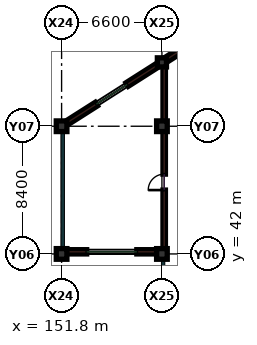
"""IFC4 building model, lengths in metres.
Left out: names, types, materials, properties, quantities, classifications, styles, units other than length and angle.
Written with IfcOpenShell. Run it as: python <this file> out.ifc"""

import sys

from ifc_helpers import new_model, si_unit, direction, frame, frame_2d, origin, origin_2d, place, context, subcontext, project, spatial, rectangle, extrude, element, fill, save


model = new_model("IFC4")
c1 = context("Model", 3, precision=1e-05, world=origin(), true_north=direction((0.0, 1.0)))
c2 = subcontext(c1, "Body", "Model", "MODEL_VIEW")
j1 = project(units=[si_unit("LENGTHUNIT", "METRE"), si_unit("PLANEANGLEUNIT", "RADIAN")], contexts=[c1])
p1 = place(None, origin())
s1 = spatial("IfcSite", under=j1, at=p1, CompositionType="ELEMENT")
p2 = place(p1, origin())
s2 = spatial("IfcBuilding", under=s1, at=p2, CompositionType="ELEMENT")
p3 = place(p2, frame((0.0, 0.0, 22.8)))
s3 = spatial("IfcBuildingStorey", under=s2, at=p3, CompositionType="ELEMENT", Elevation=22.8)
for number, where, z_axis, x_axis in (
    (1, (151.8, 42.0, 0.0), (0.0, 0.0, 1.0), (1.0, 0.0, 0.0)),
    (2, (151.8, 50.4, 0.0), (0.0, 0.0, 1.0), (1.0, 0.0, 0.0)),
    (3, (158.4, 42.0, 0.0), (0.0, 0.0, 1.0), (1.0, 0.0, 0.0)),
    (4, (158.4, 50.4, 0.0), (0.0, 0.0, 1.0), (1.0, 0.0, 0.0)),
):
    element("IfcColumn", number, at=place(p3, frame(where, z_axis=z_axis, x_axis=x_axis)), inside=s3, PredefinedType="COLUMN", context=c2, shape_type="SweptSolid", body=[
        extrude(rectangle(XDim=0.7, YDim=0.7, at=origin_2d()), origin(), (0.0, 0.0, 1.0), 4.2),
    ])
p4 = place(p3, frame((158.4, 54.6, 0.0), z_axis=(0.0, 0.0, 1.0), x_axis=(1.0, 0.0, 0.0)))
e5 = element("IfcColumn", 5, at=p4, inside=s3, PredefinedType="COLUMN", context=c2, shape_type="SweptSolid", body=[
    extrude(rectangle(XDim=0.6, YDim=0.6, at=origin_2d()), origin(), (0.0, 0.0, 1.0), 4.2),
])
p5 = place(p3, frame((158.55, 42.0, 0.0), z_axis=(0.0, 0.0, 1.0), x_axis=(0.0, 1.0, 0.0)))
e6 = element("IfcWall", 6, at=p5, inside=s3, PredefinedType="PARTITIONING", context=c2, shape_type="SweptSolid", body=[
    extrude(rectangle(XDim=7.95, YDim=0.16, at=frame_2d((3.975, 0.0))), origin(), (0.0, 0.0, 1.0), 3.23),
])
p6 = place(p5, frame((4.2, 0.0, 0.0)))
e7 = element("IfcOpeningElement", 7, at=p6, cuts=e6, PredefinedType="OPENING", context=c2, shape_type="SweptSolid", body=[
    extrude(rectangle(XDim=1.05, YDim=2.15, at=frame_2d((0.525, 1.075))), frame((0.0, 0.09, 0.0), z_axis=(0.0, -1.0, 0.0), x_axis=(1.0, 0.0, 0.0)), (0.0, 0.0, 1.0), 0.18),
])
p7 = place(p3, frame((158.55, 50.85, 0.0), z_axis=(0.0, 0.0, 1.0), x_axis=(0.0, 1.0, 0.0)))
e8 = element("IfcWall", 8, at=p7, inside=s3, PredefinedType="PARTITIONING", context=c2, shape_type="SweptSolid", body=[
    extrude(rectangle(XDim=3.8, YDim=0.16, at=frame_2d((1.9, 0.0))), origin(), (0.0, 0.0, 1.0), 3.23),
])
p8 = place(p3, frame((152.145, 42.14, 0.0), z_axis=(0.0, 0.0, 1.0), x_axis=(1.0, 0.0, 0.0)))
e9 = element("IfcWall", 9, at=p8, inside=s3, PredefinedType="SOLIDWALL", context=c2, shape_type="SweptSolid", body=[
    extrude(rectangle(XDim=5.91, YDim=0.28, at=frame_2d((2.955, 0.0))), origin(), (0.0, 0.0, 1.0), 3.365),
])
p9 = place(p8, frame((1.305, 0.0, 1.35)))
e10 = element("IfcOpeningElement", 10, at=p9, cuts=e9, PredefinedType="OPENING", context=c2, shape_type="SweptSolid", body=[
    extrude(rectangle(XDim=3.3, YDim=1.05, at=frame_2d((1.65, 0.525))), frame((0.0, 0.15, 0.0), z_axis=(0.0, -1.0, 0.0), x_axis=(1.0, 0.0, 0.0)), (0.0, 0.0, 1.0), 0.3),
])
p10 = place(p3, frame((152.05, 50.56, 0.0), z_axis=(0.0, 0.0, 1.0), x_axis=(0.843776886751, 0.536694107835, 0.0)))
e11 = element("IfcWall", 11, at=p10, inside=s3, PredefinedType="SOLIDWALL", context=c2, shape_type="SweptSolid", body=[
    extrude(rectangle(XDim=7.229, YDim=0.28, at=frame_2d((3.615, 0.0))), origin(), (0.0, 0.0, 1.0), 3.365),
])
p11 = place(p10, frame((2.415, 0.0, 0.95)))
e12 = element("IfcOpeningElement", 12, at=p11, cuts=e11, PredefinedType="OPENING", context=c2, shape_type="SweptSolid", body=[
    extrude(rectangle(XDim=2.4, YDim=1.6, at=frame_2d((1.2, 0.8))), frame((0.0, 0.15, 0.0), z_axis=(0.0, -1.0, 0.0), x_axis=(1.0, 0.0, 0.0)), (0.0, 0.0, 1.0), 0.3),
])
p12 = place(p3, frame((158.65, 54.76, 0.0), z_axis=(0.0, 0.0, 1.0), x_axis=(0.843786613851, 0.536678814829, 0.0)))
e13 = element("IfcWall", 13, at=p12, inside=s3, PredefinedType="SHEAR", context=c2, shape_type="SweptSolid", body=[
    extrude(rectangle(XDim=7.229, YDim=0.34, at=frame_2d((3.615, 0.0))), origin(), (0.0, 0.0, 1.0), 3.98),
])
p13 = place(p6, origin())
e14 = element("IfcDoor", 14, at=p13, inside=s3, OperationType="SINGLE_SWING_LEFT", PredefinedType="DOOR", context=c2, shape_type="SweptSolid", body=[
    extrude(rectangle(XDim=1.05, YDim=2.15, at=frame_2d((0.525, 1.075))), frame((0.0, 0.025, 0.0), z_axis=(0.0, -1.0, 0.0), x_axis=(1.0, 0.0, 0.0)), (0.0, 0.0, 1.0), 0.05),
])
fill(e7, e14)
p14 = place(p9, origin())
e15 = element("IfcWindow", 15, at=p14, inside=s3, PartitioningType="SINGLE_PANEL", PredefinedType="WINDOW", context=c2, shape_type="SweptSolid", body=[
    extrude(rectangle(XDim=3.3, YDim=1.05, at=frame_2d((1.65, 0.525))), frame((0.0, 0.03, 0.0), z_axis=(0.0, -1.0, 0.0), x_axis=(1.0, 0.0, 0.0)), (0.0, 0.0, 1.0), 0.06),
])
fill(e10, e15)
p15 = place(p11, origin())
e16 = element("IfcWindow", 16, at=p15, inside=s3, PartitioningType="SINGLE_PANEL", PredefinedType="WINDOW", context=c2, shape_type="SweptSolid", body=[
    extrude(rectangle(XDim=2.4, YDim=1.6, at=frame_2d((1.2, 0.8))), frame((0.0, 0.03, 0.0), z_axis=(0.0, -1.0, 0.0), x_axis=(1.0, 0.0, 0.0)), (0.0, 0.0, 1.0), 0.06),
])
fill(e12, e16)
save(model, sys.argv[1])
